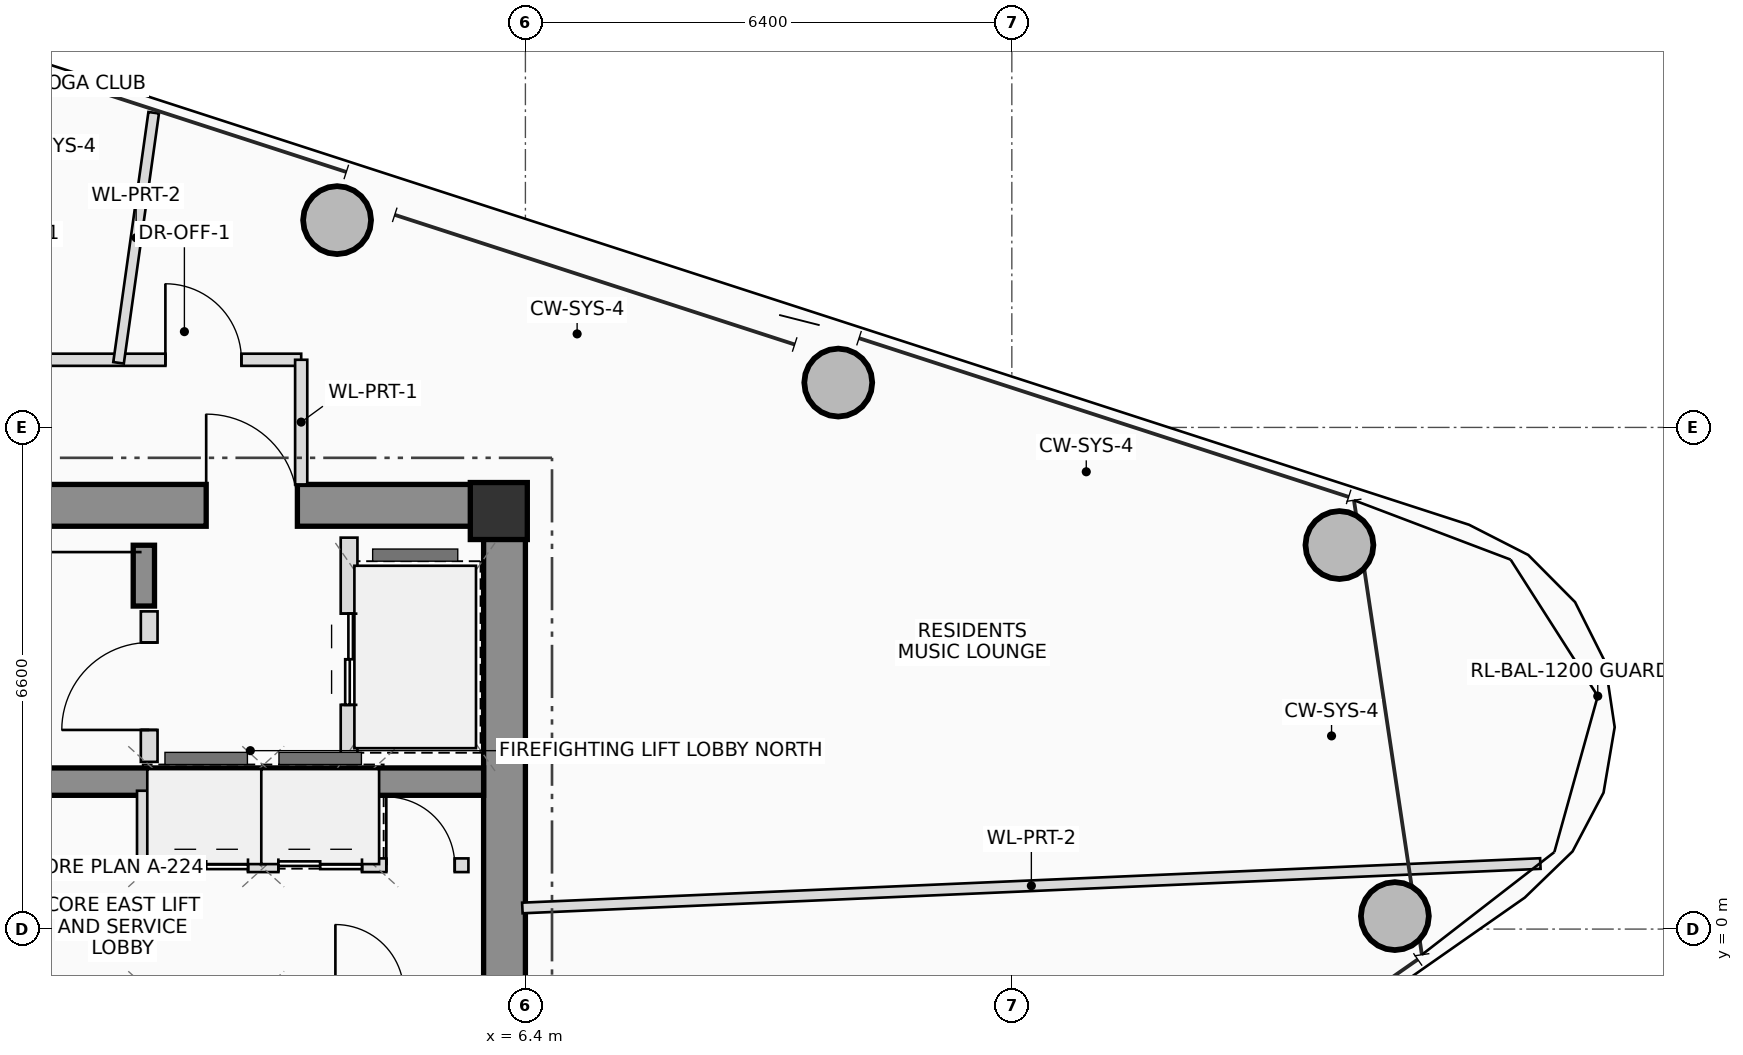
"""IFC4 building model, lengths in metres.
Left out: names, types, materials, properties, quantities, classifications, styles, units other than length and angle.
Written with IfcOpenShell. Run it as: python <this file> out.ifc"""

import sys

from ifc_helpers import new_model, si_unit, direction, frame, frame_2d, origin, origin_2d, place, context, subcontext, project, spatial, rectangle, hollow_circle, extrude, source, transform, mapped, element, fill, save


model = new_model("IFC4")
c1 = context("Model", 3, precision=1e-05, world=origin(), true_north=direction((0.0, 1.0)))
c2 = subcontext(c1, "Body", "Model", "MODEL_VIEW")
j1 = project(units=[si_unit("LENGTHUNIT", "METRE"), si_unit("PLANEANGLEUNIT", "RADIAN")], contexts=[c1])
p1 = place(None, origin())
s1 = spatial("IfcSite", under=j1, at=p1, CompositionType="ELEMENT")
p2 = place(p1, origin())
s2 = spatial("IfcBuilding", under=s1, at=p2, CompositionType="ELEMENT")
p3 = place(p2, frame((0.0, 0.0, 264.35)))
s3 = spatial("IfcBuildingStorey", under=s2, at=p3, CompositionType="ELEMENT", Elevation=264.35)
m1 = source(origin(), c2, "Body", "SweptSolid", [
    extrude(rectangle(XDim=0.75, YDim=0.75, at=origin_2d()), origin(), (0.0, 0.0, 1.0), 3.4),
])
p4 = place(p3, frame((6.05, 5.5, 0.0), z_axis=(0.0, 0.0, 1.0), x_axis=(1.0, 0.0, 0.0)))
e1 = element("IfcColumn", 1, at=p4, inside=s3, PredefinedType="COLUMN", context=c2, shape_type="MappedRepresentation", body=[
    mapped(m1, transform((0.0, 0.0, 0.0), scale=1.0)),
])
p5 = place(p3, frame((-6.4, 5.575, 0.0), z_axis=(0.0, 0.0, 1.0), x_axis=(1.0, 0.0, 0.0)))
e2 = element("IfcWall", 2, at=p5, inside=s3, PredefinedType="SHEAR", context=c2, shape_type="SweptSolid", body=[
    extrude(rectangle(XDim=12.8, YDim=0.55, at=frame_2d((6.4, 0.0))), origin(), (0.0, 0.0, 1.0), 3.4),
])
p6 = place(p5, frame((8.6, 0.0, 0.0)))
e3 = element("IfcOpeningElement", 3, at=p6, cuts=e2, PredefinedType="OPENING", context=c2, shape_type="SweptSolid", body=[
    extrude(rectangle(XDim=1.2, YDim=2.2, at=frame_2d((0.6, 1.1))), frame((0.0, 0.285, 0.0), z_axis=(0.0, -1.0, 0.0), x_axis=(1.0, 0.0, 0.0)), (0.0, 0.0, 1.0), 0.57),
])
p7 = place(p3, frame((6.125, -5.3, 0.0), z_axis=(0.0, 0.0, 1.0), x_axis=(0.0, 1.0, 0.0)))
e4 = element("IfcWall", 4, at=p7, inside=s3, PredefinedType="SHEAR", context=c2, shape_type="SweptSolid", body=[
    extrude(rectangle(XDim=10.6, YDim=0.55, at=frame_2d((5.3, 0.0))), origin(), (0.0, 0.0, 1.0), 3.4),
])
p8 = place(p3, frame((-5.85, 1.94, 0.0), z_axis=(0.0, 0.0, 1.0), x_axis=(1.0, 0.0, 0.0)))
e5 = element("IfcWall", 5, at=p8, inside=s3, PredefinedType="SHEAR", context=c2, shape_type="SweptSolid", body=[
    extrude(rectangle(XDim=11.7, YDim=0.36, at=frame_2d((5.85, 0.0))), origin(), (0.0, 0.0, 1.0), 3.4),
])
p9 = place(p3, frame((1.38, 4.25, 0.0), z_axis=(0.0, 0.0, 1.0), x_axis=(0.0, 1.0, 0.0)))
e6 = element("IfcWall", 6, at=p9, inside=s3, PredefinedType="SHEAR", context=c2, shape_type="SweptSolid", body=[
    extrude(rectangle(XDim=0.8, YDim=0.28, at=frame_2d((0.4, 0.0))), origin(), (0.0, 0.0, 1.0), 3.4),
])
m2 = source(origin(), c2, "Body", "SweptSolid", [
    extrude(hollow_circle(Radius=0.45, WallThickness=0.032, at=origin_2d()), origin(), (0.0, 0.0, 1.0), 3.4),
])
for number, where, z_axis, x_axis in (
    (7, (17.84, 0.171, 0.0), (0.0, 0.0, 1.0), (1.0, 0.0, 0.0)),
    (8, (17.11, 5.052, 0.0), (0.0, 0.0, 1.0), (1.0, 0.0, 0.0)),
    (9, (10.516, 7.19, 0.0), (0.0, 0.0, 1.0), (1.0, 0.0, 0.0)),
    (10, (3.922, 9.327, 0.0), (0.0, 0.0, 1.0), (1.0, 0.0, 0.0)),
):
    element("IfcColumn", number, at=place(p3, frame(where, z_axis=z_axis, x_axis=x_axis)), inside=s3, PredefinedType="COLUMN", context=c2, shape_type="MappedRepresentation", body=[
        mapped(m2, transform((0.0, 0.0, 0.0), scale=1.0)),
    ])
p10 = place(p3, frame((1.45, 2.2, 0.0), z_axis=(0.0, 0.0, 1.0), x_axis=(0.0, 1.0, 0.0)))
e11 = element("IfcWall", 11, at=p10, inside=s3, PredefinedType="PLUMBINGWALL", context=c2, shape_type="SweptSolid", body=[
    extrude(rectangle(XDim=1.98, YDim=0.22, at=frame_2d((0.99, 0.0))), origin(), (0.0, 0.0, 1.0), 3.2),
])
p11 = place(p10, frame((0.42, 0.0, 0.0)))
e12 = element("IfcOpeningElement", 12, at=p11, cuts=e11, PredefinedType="OPENING", context=c2, shape_type="SweptSolid", body=[
    extrude(rectangle(XDim=1.15, YDim=2.15, at=frame_2d((0.575, 1.075))), frame((0.0, 0.12, 0.0), z_axis=(0.0, -1.0, 0.0), x_axis=(1.0, 0.0, 0.0)), (0.0, 0.0, 1.0), 0.24),
])
p12 = place(p3, frame((4.08, 2.2, 0.0), z_axis=(0.0, 0.0, 1.0), x_axis=(0.0, 1.0, 0.0)))
e13 = element("IfcWall", 13, at=p12, inside=s3, PredefinedType="PLUMBINGWALL", context=c2, shape_type="SweptSolid", body=[
    extrude(rectangle(XDim=2.95, YDim=0.22, at=frame_2d((1.475, 0.0))), origin(), (0.0, 0.0, 1.0), 3.2),
])
p13 = place(p12, frame((0.75, 0.0, 0.0)))
e14 = element("IfcOpeningElement", 14, at=p13, cuts=e13, PredefinedType="OPENING", context=c2, shape_type="SweptSolid", body=[
    extrude(rectangle(XDim=1.2, YDim=2.25, at=frame_2d((0.6, 1.125))), frame((0.0, 0.12, 0.0), z_axis=(0.0, -1.0, 0.0), x_axis=(1.0, 0.0, 0.0)), (0.0, 0.0, 1.0), 0.24),
])
for number, where, z_axis, x_axis in (
    (15, (1.38, 0.84, 0.0), (0.0, 0.0, 1.0), (0.0, 1.0, 0.0)),
    (16, (3.02, 0.84, 0.0), (0.0, 0.0, 1.0), (0.0, 1.0, 0.0)),
    (17, (4.38, 0.84, 0.0), (0.0, 0.0, 1.0), (0.0, 1.0, 0.0)),
):
    element("IfcWall", number, at=place(p3, frame(where, z_axis=z_axis, x_axis=x_axis)), inside=s3, PredefinedType="PLUMBINGWALL", context=c2, shape_type="SweptSolid", body=[
        extrude(rectangle(XDim=0.98, YDim=0.18, at=frame_2d((0.49, 0.0))), origin(), (0.0, 0.0, 1.0), 3.2),
    ])
p14 = place(p3, frame((-5.68, 0.84, 0.0), z_axis=(0.0, 0.0, 1.0), x_axis=(1.0, 0.0, 0.0)))
e18 = element("IfcWall", 18, at=p14, inside=s3, PredefinedType="PLUMBINGWALL", context=c2, shape_type="SweptSolid", body=[
    extrude(rectangle(XDim=11.33, YDim=0.18, at=frame_2d((5.665, 0.0))), origin(), (0.0, 0.0, 1.0), 3.2),
])
p15 = place(p14, frame((3.13, 0.0, 0.0)))
e19 = element("IfcOpeningElement", 19, at=p15, cuts=e18, PredefinedType="OPENING", context=c2, shape_type="SweptSolid", body=[
    extrude(rectangle(XDim=0.9, YDim=2.05, at=frame_2d((0.45, 1.025))), frame((0.0, 0.1, 0.0), z_axis=(0.0, -1.0, 0.0), x_axis=(1.0, 0.0, 0.0)), (0.0, 0.0, 1.0), 0.2),
])
p16 = place(p14, frame((7.33, 0.0, 0.0)))
e20 = element("IfcOpeningElement", 20, at=p16, cuts=e18, PredefinedType="OPENING", context=c2, shape_type="SweptSolid", body=[
    extrude(rectangle(XDim=1.1, YDim=2.2, at=frame_2d((0.55, 1.1))), frame((0.0, 0.1, 0.0), z_axis=(0.0, -1.0, 0.0), x_axis=(1.0, 0.0, 0.0)), (0.0, 0.0, 1.0), 0.2),
])
p17 = place(p14, frame((8.83, 0.0, 0.0)))
e21 = element("IfcOpeningElement", 21, at=p17, cuts=e18, PredefinedType="OPENING", context=c2, shape_type="SweptSolid", body=[
    extrude(rectangle(XDim=1.1, YDim=2.2, at=frame_2d((0.55, 1.1))), frame((0.0, 0.1, 0.0), z_axis=(0.0, -1.0, 0.0), x_axis=(1.0, 0.0, 0.0)), (0.0, 0.0, 1.0), 0.2),
])
p18 = place(p14, frame((10.25, 0.0, 0.0)))
e22 = element("IfcOpeningElement", 22, at=p18, cuts=e18, PredefinedType="OPENING", context=c2, shape_type="SweptSolid", body=[
    extrude(rectangle(XDim=0.9, YDim=2.05, at=frame_2d((0.45, 1.025))), frame((0.0, 0.1, 0.0), z_axis=(0.0, -1.0, 0.0), x_axis=(1.0, 0.0, 0.0)), (0.0, 0.0, 1.0), 0.2),
])
p19 = place(p3, frame((-6.36, 7.49, 0.0), z_axis=(0.0, 0.0, 1.0), x_axis=(1.0, 0.0, 0.0)))
e23 = element("IfcWall", 23, at=p19, inside=s3, PredefinedType="PARTITIONING", context=c2, shape_type="SweptSolid", body=[
    extrude(rectangle(XDim=9.81, YDim=0.16, at=frame_2d((4.905, 0.0))), origin(), (0.0, 0.0, 1.0), 2.605),
])
p20 = place(p19, frame((5.284, 0.0, 0.0)))
e24 = element("IfcOpeningElement", 24, at=p20, cuts=e23, PredefinedType="OPENING", context=c2, shape_type="SweptSolid", body=[
    extrude(rectangle(XDim=1.0, YDim=2.25, at=frame_2d((0.5, 1.125))), frame((0.0, 0.09, 0.0), z_axis=(0.0, -1.0, 0.0), x_axis=(1.0, 0.0, 0.0)), (0.0, 0.0, 1.0), 0.18),
])
p21 = place(p19, frame((8.023, 0.0, 0.0)))
e25 = element("IfcOpeningElement", 25, at=p21, cuts=e23, PredefinedType="OPENING", context=c2, shape_type="SweptSolid", body=[
    extrude(rectangle(XDim=1.0, YDim=2.25, at=frame_2d((0.5, 1.125))), frame((0.0, 0.09, 0.0), z_axis=(0.0, -1.0, 0.0), x_axis=(1.0, 0.0, 0.0)), (0.0, 0.0, 1.0), 0.18),
])
p22 = place(p3, frame((3.45, 7.49, 0.0), z_axis=(0.0, 0.0, 1.0), x_axis=(0.0, -1.0, 0.0)))
e26 = element("IfcWall", 26, at=p22, inside=s3, PredefinedType="PARTITIONING", context=c2, shape_type="SweptSolid", body=[
    extrude(rectangle(XDim=1.64, YDim=0.16, at=frame_2d((0.82, 0.0))), origin(), (0.0, 0.0, 1.0), 2.805),
])
p23 = place(p3, frame((6.36, 0.278, 0.0), z_axis=(0.0, 0.0, 1.0), x_axis=(0.999047617824, 0.043633213494, 0.0)))
e27 = element("IfcWall", 27, at=p23, inside=s3, PredefinedType="PARTITIONING", context=c2, shape_type="SweptSolid", body=[
    extrude(rectangle(XDim=13.406, YDim=0.14, at=frame_2d((6.703, 0.0))), origin(), (0.0, 0.0, 1.0), 2.605),
])
p24 = place(p3, frame((1.047, 7.45, 0.0), z_axis=(0.0, 0.0, 1.0), x_axis=(0.13916814145, 0.990268765743, 0.0)))
e28 = element("IfcWall", 28, at=p24, inside=s3, PredefinedType="PARTITIONING", context=c2, shape_type="SweptSolid", body=[
    extrude(rectangle(XDim=3.323, YDim=0.14, at=frame_2d((1.661, 0.0))), origin(), (0.0, 0.0, 1.0), 2.765),
])
p25 = place(p6, origin())
e29 = element("IfcDoor", 29, at=p25, inside=s3, OperationType="SINGLE_SWING_LEFT", PredefinedType="DOOR", context=c2, shape_type="SweptSolid", body=[
    extrude(rectangle(XDim=1.2, YDim=2.2, at=frame_2d((0.6, 1.1))), frame((0.0, 0.025, 0.0), z_axis=(0.0, -1.0, 0.0), x_axis=(1.0, 0.0, 0.0)), (0.0, 0.0, 1.0), 0.05),
])
fill(e3, e29)
p26 = place(p11, origin())
e30 = element("IfcDoor", 30, at=p26, inside=s3, OperationType="SINGLE_SWING_LEFT", PredefinedType="DOOR", context=c2, shape_type="SweptSolid", body=[
    extrude(rectangle(XDim=1.15, YDim=2.15, at=frame_2d((0.575, 1.075))), frame((0.0, 0.025, 0.0), z_axis=(0.0, -1.0, 0.0), x_axis=(1.0, 0.0, 0.0)), (0.0, 0.0, 1.0), 0.05),
])
fill(e12, e30)
p27 = place(p13, origin())
e31 = element("IfcDoor", 31, at=p27, inside=s3, OperationType="DOUBLE_DOOR_SLIDING", PredefinedType="DOOR", context=c2, shape_type="SweptSolid", body=[
    extrude(rectangle(XDim=1.2, YDim=2.25, at=frame_2d((0.6, 1.125))), frame((0.0, 0.025, 0.0), z_axis=(0.0, -1.0, 0.0), x_axis=(1.0, 0.0, 0.0)), (0.0, 0.0, 1.0), 0.05),
])
fill(e14, e31)
p28 = place(p16, origin())
e32 = element("IfcDoor", 32, at=p28, inside=s3, OperationType="DOUBLE_DOOR_SLIDING", PredefinedType="DOOR", context=c2, shape_type="SweptSolid", body=[
    extrude(rectangle(XDim=1.1, YDim=2.2, at=frame_2d((0.55, 1.1))), frame((0.0, 0.025, 0.0), z_axis=(0.0, -1.0, 0.0), x_axis=(1.0, 0.0, 0.0)), (0.0, 0.0, 1.0), 0.05),
])
fill(e20, e32)
p29 = place(p17, origin())
e33 = element("IfcDoor", 33, at=p29, inside=s3, OperationType="DOUBLE_DOOR_SLIDING", PredefinedType="DOOR", context=c2, shape_type="SweptSolid", body=[
    extrude(rectangle(XDim=1.1, YDim=2.2, at=frame_2d((0.55, 1.1))), frame((0.0, 0.025, 0.0), z_axis=(0.0, -1.0, 0.0), x_axis=(1.0, 0.0, 0.0)), (0.0, 0.0, 1.0), 0.05),
])
fill(e21, e33)
p30 = place(p18, origin())
e34 = element("IfcDoor", 34, at=p30, inside=s3, OperationType="SINGLE_SWING_LEFT", PredefinedType="DOOR", context=c2, shape_type="SweptSolid", body=[
    extrude(rectangle(XDim=0.9, YDim=2.05, at=frame_2d((0.45, 1.025))), frame((0.0, 0.025, 0.0), z_axis=(0.0, -1.0, 0.0), x_axis=(1.0, 0.0, 0.0)), (0.0, 0.0, 1.0), 0.05),
])
fill(e22, e34)
p31 = place(p21, origin())
e35 = element("IfcDoor", 35, at=p31, inside=s3, OperationType="SINGLE_SWING_LEFT", PredefinedType="DOOR", context=c2, shape_type="SweptSolid", body=[
    extrude(rectangle(XDim=1.0, YDim=2.25, at=frame_2d((0.5, 1.125))), frame((0.0, 0.025, 0.0), z_axis=(0.0, -1.0, 0.0), x_axis=(1.0, 0.0, 0.0)), (0.0, 0.0, 1.0), 0.05),
])
fill(e25, e35)
save(model, sys.argv[1])
